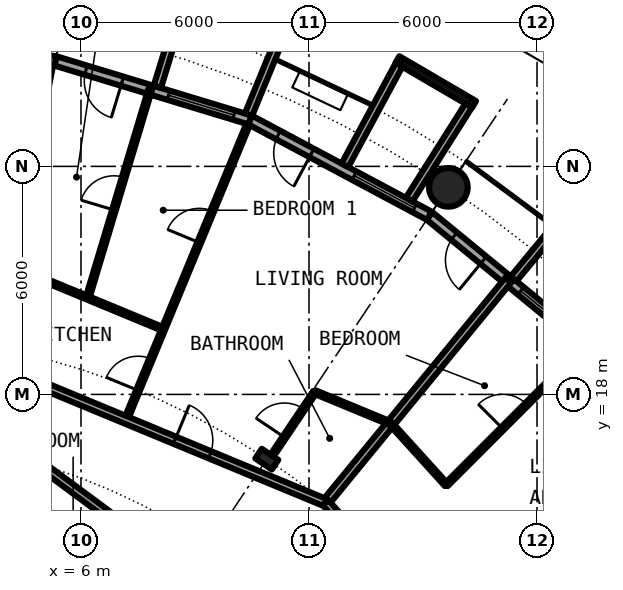
"""IFC4 building model, lengths in metres.
Left out: names, types, materials, properties, quantities, classifications, styles, units other than length and angle.
Written with IfcOpenShell. Run it as: python <this file> out.ifc"""

import sys

from ifc_helpers import new_model, si_unit, direction, frame, frame_2d, origin, origin_2d, place, context, subcontext, project, spatial, rectangle, circle, hollow_circle, i_section, extrude, element, fill, save


model = new_model("IFC4")
c1 = context("Model", 3, precision=1e-05, world=origin(), true_north=direction((0.0, 1.0)))
c2 = subcontext(c1, "Body", "Model", "MODEL_VIEW")
j1 = project(units=[si_unit("LENGTHUNIT", "METRE"), si_unit("PLANEANGLEUNIT", "RADIAN")], contexts=[c1])
p1 = place(None, origin())
s1 = spatial("IfcSite", under=j1, at=p1, CompositionType="ELEMENT")
p2 = place(p1, origin())
s2 = spatial("IfcBuilding", under=s1, at=p2, CompositionType="ELEMENT")
p3 = place(p2, frame((0.0, 0.0, 72.75)))
s3 = spatial("IfcBuildingStorey", under=s2, at=p3, CompositionType="ELEMENT", Elevation=72.75)
p4 = place(p3, frame((15.667, 23.448, 0.0), z_axis=(0.0, 0.0, 1.0), x_axis=(1.0, 0.0, 0.0)))
e1 = element("IfcColumn", 1, at=p4, inside=s3, PredefinedType="COLUMN", context=c2, shape_type="SweptSolid", body=[
    extrude(hollow_circle(Radius=0.508, WallThickness=0.04, at=origin_2d()), origin(), (0.0, 0.0, 1.0), 3.05),
])
p5 = place(p3, frame((10.889, 16.297, 0.0), z_axis=(0.0, 0.0, 1.0), x_axis=(0.55557023302, 0.831469612303, 0.0)))
e2 = element("IfcColumn", 2, at=p5, inside=s3, PredefinedType="COLUMN", context=c2, shape_type="SweptSolid", body=[
    extrude(i_section(OverallWidth=0.306, OverallDepth=0.524, WebThickness=0.021, FlangeThickness=0.04, FilletRadius=0.027, at=origin_2d()), origin(), (0.0, 0.0, 1.0), 3.05),
])
p6 = place(p3, frame((19.304, 19.304, 0.0), z_axis=(0.0, 0.0, 1.0), x_axis=(-0.773019449054, 0.634382322723, 0.0)))
e3 = element("IfcWall", 3, at=p6, inside=s3, PredefinedType="SOLIDWALL", context=c2, shape_type="SweptSolid", body=[
    extrude(rectangle(XDim=5.352, YDim=0.25, at=frame_2d((2.676, 0.0))), origin(), (0.0, 0.0, 1.0), 2.7),
])
p7 = place(p6, frame((0.441, 0.0, 0.3)))
e4 = element("IfcOpeningElement", 4, at=p7, cuts=e3, PredefinedType="OPENING", context=c2, shape_type="SweptSolid", body=[
    extrude(rectangle(XDim=1.8, YDim=2.1, at=frame_2d((0.9, 1.05))), frame((0.0, 0.135, 0.0), z_axis=(0.0, -1.0, 0.0), x_axis=(1.0, 0.0, 0.0)), (0.0, 0.0, 1.0), 0.27),
])
p8 = place(p6, frame((3.51, 0.0, 0.0)))
e5 = element("IfcOpeningElement", 5, at=p8, cuts=e3, PredefinedType="OPENING", context=c2, shape_type="SweptSolid", body=[
    extrude(rectangle(XDim=1.0, YDim=2.2, at=frame_2d((0.5, 1.1))), frame((0.0, 0.135, 0.0), z_axis=(0.0, -1.0, 0.0), x_axis=(1.0, 0.0, 0.0)), (0.0, 0.0, 1.0), 0.27),
])
p9 = place(p3, frame((17.384, 21.041, -0.03), z_axis=(0.0, 0.0, 1.0), x_axis=(0.63709551667, 0.770784861449, 0.0)))
e6 = element("IfcWall", 6, at=p9, inside=s3, PredefinedType="SOLIDWALL", context=c2, shape_type="SweptSolid", body=[
    extrude(rectangle(XDim=3.006, YDim=0.2, at=frame_2d((1.503, 0.0))), origin(), (0.0, 0.0, 1.0), 2.73),
])
p10 = place(p3, frame((15.167, 22.699, 0.0), z_axis=(0.0, 0.0, 1.0), x_axis=(-0.881915646801, 0.471407246368, 0.0)))
e7 = element("IfcWall", 7, at=p10, inside=s3, PredefinedType="SOLIDWALL", context=c2, shape_type="SweptSolid", body=[
    extrude(rectangle(XDim=5.352, YDim=0.25, at=frame_2d((2.676, 0.0))), origin(), (0.0, 0.0, 1.0), 2.7),
])
p11 = place(p10, frame((0.441, 0.0, 0.3)))
e8 = element("IfcOpeningElement", 8, at=p11, cuts=e7, PredefinedType="OPENING", context=c2, shape_type="SweptSolid", body=[
    extrude(rectangle(XDim=1.8, YDim=2.1, at=frame_2d((0.9, 1.05))), frame((0.0, 0.135, 0.0), z_axis=(0.0, -1.0, 0.0), x_axis=(1.0, 0.0, 0.0)), (0.0, 0.0, 1.0), 0.27),
])
p12 = place(p10, frame((3.51, 0.0, 0.0)))
e9 = element("IfcOpeningElement", 9, at=p12, cuts=e7, PredefinedType="OPENING", context=c2, shape_type="SweptSolid", body=[
    extrude(rectangle(XDim=1.0, YDim=2.2, at=frame_2d((0.5, 1.1))), frame((0.0, 0.135, 0.0), z_axis=(0.0, -1.0, 0.0), x_axis=(1.0, 0.0, 0.0)), (0.0, 0.0, 1.0), 0.27),
])
p13 = place(p3, frame((16.344, 25.633, -0.03), z_axis=(0.0, 0.0, 1.0), x_axis=(-0.863346521872, 0.504611517081, 0.0)))
e10 = element("IfcWall", 10, at=p13, inside=s3, PredefinedType="SOLIDWALL", context=c2, shape_type="SweptSolid", body=[
    extrude(rectangle(XDim=2.336, YDim=0.2, at=frame_2d((1.168, 0.0))), origin(), (0.0, 0.0, 1.0), 2.73),
])
p14 = place(p13, frame((0.128, 0.0, 0.33)))
e11 = element("IfcOpeningElement", 11, at=p14, cuts=e10, PredefinedType="OPENING", context=c2, shape_type="SweptSolid", body=[
    extrude(circle(Radius=1.04, at=frame_2d((1.04, 1.04))), frame((0.0, 0.11, 0.0), z_axis=(0.0, -1.0, 0.0), x_axis=(1.0, 0.0, 0.0)), (0.0, 0.0, 1.0), 0.22),
])
p15 = place(p3, frame((14.635, 23.126, -0.03), z_axis=(0.0, 0.0, 1.0), x_axis=(0.534437802731, 0.845207805816, 0.0)))
e12 = element("IfcWall", 12, at=p15, inside=s3, PredefinedType="SOLIDWALL", context=c2, shape_type="SweptSolid", body=[
    extrude(rectangle(XDim=2.932, YDim=0.2, at=frame_2d((1.466, 0.0))), origin(), (0.0, 0.0, 1.0), 2.73),
])
p16 = place(p3, frame((12.945, 24.029, -0.03), z_axis=(0.0, 0.0, 1.0), x_axis=(0.474424310775, 0.88029629861, 0.0)))
e13 = element("IfcWall", 13, at=p16, inside=s3, PredefinedType="SOLIDWALL", context=c2, shape_type="SweptSolid", body=[
    extrude(rectangle(XDim=3.006, YDim=0.2, at=frame_2d((1.503, 0.0))), origin(), (0.0, 0.0, 1.0), 2.73),
])
p17 = place(p3, frame((10.447, 25.222, 0.0), z_axis=(0.0, 0.0, 1.0), x_axis=(-0.956965678721, 0.290201119486, 0.0)))
e14 = element("IfcWall", 14, at=p17, inside=s3, PredefinedType="SOLIDWALL", context=c2, shape_type="SweptSolid", body=[
    extrude(rectangle(XDim=5.351, YDim=0.25, at=frame_2d((2.676, 0.0))), origin(), (0.0, 0.0, 1.0), 2.7),
])
p18 = place(p17, frame((0.441, 0.0, 0.3)))
e15 = element("IfcOpeningElement", 15, at=p18, cuts=e14, PredefinedType="OPENING", context=c2, shape_type="SweptSolid", body=[
    extrude(rectangle(XDim=1.8, YDim=2.1, at=frame_2d((0.9, 1.05))), frame((0.0, 0.135, 0.0), z_axis=(0.0, -1.0, 0.0), x_axis=(1.0, 0.0, 0.0)), (0.0, 0.0, 1.0), 0.27),
])
p19 = place(p17, frame((3.51, 0.0, 0.0)))
e16 = element("IfcOpeningElement", 16, at=p19, cuts=e14, PredefinedType="OPENING", context=c2, shape_type="SweptSolid", body=[
    extrude(rectangle(XDim=1.0, YDim=2.2, at=frame_2d((0.5, 1.1))), frame((0.0, 0.135, 0.0), z_axis=(0.0, -1.0, 0.0), x_axis=(1.0, 0.0, 0.0)), (0.0, 0.0, 1.0), 0.27),
])
p20 = place(p3, frame((10.409, 25.364, -0.03), z_axis=(0.0, 0.0, 1.0), x_axis=(0.379509886562, 0.925187681501, 0.0)))
e17 = element("IfcWall", 17, at=p20, inside=s3, PredefinedType="SOLIDWALL", context=c2, shape_type="SweptSolid", body=[
    extrude(rectangle(XDim=2.883, YDim=0.2, at=frame_2d((1.441, 0.0))), origin(), (0.0, 0.0, 1.0), 2.73),
])
p21 = place(p3, frame((8.009, 26.092, -0.03), z_axis=(0.0, 0.0, 1.0), x_axis=(0.293406695073, 0.955987715029, 0.0)))
e18 = element("IfcWall", 18, at=p21, inside=s3, PredefinedType="SOLIDWALL", context=c2, shape_type="SweptSolid", body=[
    extrude(rectangle(XDim=3.006, YDim=0.2, at=frame_2d((1.503, 0.0))), origin(), (0.0, 0.0, 1.0), 2.73),
])
p22 = place(p3, frame((5.326, 26.775, 0.0), z_axis=(0.0, 0.0, 1.0), x_axis=(-0.995173996315, 0.098126026407, 0.0)))
e19 = element("IfcWall", 19, at=p22, inside=s3, PredefinedType="SOLIDWALL", context=c2, shape_type="SweptSolid", body=[
    extrude(rectangle(XDim=5.352, YDim=0.25, at=frame_2d((2.676, 0.0))), origin(), (0.0, 0.0, 1.0), 2.7),
])
p23 = place(p22, frame((0.441, 0.0, 0.3)))
e20 = element("IfcOpeningElement", 20, at=p23, cuts=e19, PredefinedType="OPENING", context=c2, shape_type="SweptSolid", body=[
    extrude(rectangle(XDim=1.8, YDim=2.1, at=frame_2d((0.9, 1.05))), frame((0.0, 0.135, 0.0), z_axis=(0.0, -1.0, 0.0), x_axis=(1.0, 0.0, 0.0)), (0.0, 0.0, 1.0), 0.27),
])
p24 = place(p22, frame((3.51, 0.0, 0.0)))
e21 = element("IfcOpeningElement", 21, at=p24, cuts=e19, PredefinedType="OPENING", context=c2, shape_type="SweptSolid", body=[
    extrude(rectangle(XDim=1.0, YDim=2.2, at=frame_2d((0.5, 1.1))), frame((0.0, 0.135, 0.0), z_axis=(0.0, -1.0, 0.0), x_axis=(1.0, 0.0, 0.0)), (0.0, 0.0, 1.0), 0.27),
])
p25 = place(p3, frame((4.671, 26.966, -0.03), z_axis=(0.0, 0.0, 1.0), x_axis=(0.170539878907, 0.985350774954, 0.0)))
e22 = element("IfcWall", 22, at=p25, inside=s3, PredefinedType="SOLIDWALL", context=c2, shape_type="SweptSolid", body=[
    extrude(rectangle(XDim=2.932, YDim=0.2, at=frame_2d((1.466, 0.0))), origin(), (0.0, 0.0, 1.0), 2.73),
])
p26 = place(p3, frame((7.178, 17.328, 0.0), z_axis=(0.0, 0.0, 1.0), x_axis=(0.382458509789, 0.923972666419, 0.0)))
e23 = element("IfcWall", 23, at=p26, inside=s3, PredefinedType="PARTITIONING", context=c2, shape_type="SweptSolid", body=[
    extrude(rectangle(XDim=8.419, YDim=0.1, at=frame_2d((4.209, 0.0))), origin(), (0.0, 0.0, 1.0), 2.7),
])
p27 = place(p26, frame((0.841, 0.0, 0.0)))
e24 = element("IfcOpeningElement", 24, at=p27, cuts=e23, PredefinedType="OPENING", context=c2, shape_type="SweptSolid", body=[
    extrude(rectangle(XDim=0.9, YDim=2.3, at=frame_2d((0.45, 1.15))), frame((0.0, 0.06, 0.0), z_axis=(0.0, -1.0, 0.0), x_axis=(1.0, 0.0, 0.0)), (0.0, 0.0, 1.0), 0.12),
])
p28 = place(p26, frame((5.051, 0.0, 0.0)))
e25 = element("IfcOpeningElement", 25, at=p28, cuts=e23, PredefinedType="OPENING", context=c2, shape_type="SweptSolid", body=[
    extrude(rectangle(XDim=0.9, YDim=2.3, at=frame_2d((0.45, 1.15))), frame((0.0, 0.06, 0.0), z_axis=(0.0, -1.0, 0.0), x_axis=(1.0, 0.0, 0.0)), (0.0, 0.0, 1.0), 0.12),
])
p29 = place(p3, frame((16.515, 11.034, 0.0), z_axis=(0.0, 0.0, 1.0), x_axis=(0.831382022135, 0.555701298605, 0.0)))
e26 = element("IfcWall", 26, at=p29, inside=s3, PredefinedType="PARTITIONING", context=c2, shape_type="SweptSolid", body=[
    extrude(rectangle(XDim=7.313, YDim=0.2, at=frame_2d((3.657, 0.0))), origin(), (0.0, 0.0, 1.0), 2.7),
])
p30 = place(p3, frame((4.179, 21.367, 0.0), z_axis=(0.0, 0.0, 1.0), x_axis=(0.192109041462, 0.981373586453, 0.0)))
e27 = element("IfcWall", 27, at=p30, inside=s3, PredefinedType="PARTITIONING", context=c2, shape_type="SweptSolid", body=[
    extrude(rectangle(XDim=5.404, YDim=0.1, at=frame_2d((2.702, 0.0))), origin(), (0.0, 0.0, 1.0), 2.7),
])
p31 = place(p30, frame((2.252, 0.0, 0.0)))
e28 = element("IfcOpeningElement", 28, at=p31, cuts=e27, PredefinedType="OPENING", context=c2, shape_type="SweptSolid", body=[
    extrude(rectangle(XDim=0.9, YDim=2.3, at=frame_2d((0.45, 1.15))), frame((0.0, 0.06, 0.0), z_axis=(0.0, -1.0, 0.0), x_axis=(1.0, 0.0, 0.0)), (0.0, 0.0, 1.0), 0.12),
])
p32 = place(p3, frame((6.173, 20.541, 0.0), z_axis=(0.0, 0.0, 1.0), x_axis=(0.287793773423, 0.957692405723, 0.0)))
e29 = element("IfcWall", 29, at=p32, inside=s3, PredefinedType="PARTITIONING", context=c2, shape_type="SweptSolid", body=[
    extrude(rectangle(XDim=5.726, YDim=0.1, at=frame_2d((2.863, 0.0))), origin(), (0.0, 0.0, 1.0), 2.7),
])
p33 = place(p32, frame((2.413, 0.0, 0.0)))
e30 = element("IfcOpeningElement", 30, at=p33, cuts=e29, PredefinedType="OPENING", context=c2, shape_type="SweptSolid", body=[
    extrude(rectangle(XDim=0.9, YDim=2.3, at=frame_2d((0.45, 1.15))), frame((0.0, 0.06, 0.0), z_axis=(0.0, -1.0, 0.0), x_axis=(1.0, 0.0, 0.0)), (0.0, 0.0, 1.0), 0.12),
])
p34 = place(p3, frame((11.087, 16.48, 0.0), z_axis=(0.0, 0.0, 1.0), x_axis=(0.558383137663, 0.829583191472, 0.0)))
e31 = element("IfcWall", 31, at=p34, inside=s3, PredefinedType="PARTITIONING", context=c2, shape_type="SweptSolid", body=[
    extrude(rectangle(XDim=1.909, YDim=0.1, at=frame_2d((0.955, 0.0))), origin(), (0.0, 0.0, 1.0), 2.7),
])
p35 = place(p34, frame((0.474, 0.0, 0.0)))
e32 = element("IfcOpeningElement", 32, at=p35, cuts=e31, PredefinedType="OPENING", context=c2, shape_type="SweptSolid", body=[
    extrude(rectangle(XDim=0.9, YDim=2.3, at=frame_2d((0.45, 1.15))), frame((0.0, 0.06, 0.0), z_axis=(0.0, -1.0, 0.0), x_axis=(1.0, 0.0, 0.0)), (0.0, 0.0, 1.0), 0.12),
])
p36 = place(p3, frame((12.435, 15.15, 0.0), z_axis=(0.0, 0.0, 1.0), x_axis=(0.634458323308, 0.772957072537, 0.0)))
e33 = element("IfcWall", 33, at=p36, inside=s3, PredefinedType="PARTITIONING", context=c2, shape_type="SweptSolid", body=[
    extrude(rectangle(XDim=7.576, YDim=0.2, at=frame_2d((3.788, 0.0))), origin(), (0.0, 0.0, 1.0), 2.7),
])
p37 = place(p3, frame((15.612, 15.622, 0.0), z_axis=(0.0, 0.0, 1.0), x_axis=(0.706914880313, 0.707298629994, 0.0)))
e34 = element("IfcWall", 34, at=p37, inside=s3, PredefinedType="PARTITIONING", context=c2, shape_type="SweptSolid", body=[
    extrude(rectangle(XDim=5.09, YDim=0.1, at=frame_2d((2.545, 0.0))), origin(), (0.0, 0.0, 1.0), 2.7),
])
p38 = place(p37, frame((2.095, 0.0, 0.0)))
e35 = element("IfcOpeningElement", 35, at=p38, cuts=e34, PredefinedType="OPENING", context=c2, shape_type="SweptSolid", body=[
    extrude(rectangle(XDim=0.9, YDim=2.3, at=frame_2d((0.45, 1.15))), frame((0.0, 0.06, 0.0), z_axis=(0.0, -1.0, 0.0), x_axis=(1.0, 0.0, 0.0)), (0.0, 0.0, 1.0), 0.12),
])
p39 = place(p3, frame((4.906, 16.172, 0.0), z_axis=(0.0, 0.0, 1.0), x_axis=(0.803204584823, -0.59570327758, 0.0)))
e36 = element("IfcWall", 36, at=p39, inside=s3, PredefinedType="PARTITIONING", context=c2, shape_type="SweptSolid", body=[
    extrude(rectangle(XDim=11.387, YDim=0.2, at=frame_2d((5.693, 0.0))), origin(), (0.0, 0.0, 1.0), 2.7),
])
p40 = place(p39, frame((4.38, 0.0, 0.0)))
e37 = element("IfcOpeningElement", 37, at=p40, cuts=e36, PredefinedType="OPENING", context=c2, shape_type="SweptSolid", body=[
    extrude(rectangle(XDim=1.0, YDim=2.3, at=frame_2d((0.5, 1.15))), frame((0.0, 0.11, 0.0), z_axis=(0.0, -1.0, 0.0), x_axis=(1.0, 0.0, 0.0)), (0.0, 0.0, 1.0), 0.22),
])
p41 = place(p3, frame((1.921, 19.506, 0.0), z_axis=(0.0, 0.0, 1.0), x_axis=(0.923845560554, -0.38276543763, 0.0)))
e38 = element("IfcWall", 38, at=p41, inside=s3, PredefinedType="PARTITIONING", context=c2, shape_type="SweptSolid", body=[
    extrude(rectangle(XDim=11.381, YDim=0.2, at=frame_2d((5.69, 0.0))), origin(), (0.0, 0.0, 1.0), 2.7),
])
p42 = place(p41, frame((7.087, 0.0, 0.0)))
e39 = element("IfcOpeningElement", 39, at=p42, cuts=e38, PredefinedType="OPENING", context=c2, shape_type="SweptSolid", body=[
    extrude(rectangle(XDim=1.0, YDim=2.3, at=frame_2d((0.5, 1.15))), frame((0.0, 0.11, 0.0), z_axis=(0.0, -1.0, 0.0), x_axis=(1.0, 0.0, 0.0)), (0.0, 0.0, 1.0), 0.22),
])
p43 = place(p3, frame((12.434, 15.151, 0.0), z_axis=(0.0, 0.0, 1.0), x_axis=(0.671601747072, -0.740912338492, 0.0)))
e40 = element("IfcWall", 40, at=p43, inside=s3, PredefinedType="PARTITIONING", context=c2, shape_type="SweptSolid", body=[
    extrude(rectangle(XDim=5.597, YDim=0.2, at=frame_2d((2.799, 0.0))), origin(), (0.0, 0.0, 1.0), 2.38),
])
p44 = place(p43, frame((1.417, 0.0, 0.0)))
e41 = element("IfcOpeningElement", 41, at=p44, cuts=e40, PredefinedType="OPENING", context=c2, shape_type="SweptSolid", body=[
    extrude(rectangle(XDim=1.0, YDim=2.3, at=frame_2d((0.5, 1.15))), frame((0.0, 0.11, 0.0), z_axis=(0.0, -1.0, 0.0), x_axis=(1.0, 0.0, 0.0)), (0.0, 0.0, 1.0), 0.22),
])
p45 = place(p3, frame((2.185, 22.193, 0.0), z_axis=(0.0, 0.0, 1.0), x_axis=(0.923844914631, -0.382766996632, 0.0)))
e42 = element("IfcWall", 42, at=p45, inside=s3, PredefinedType="PARTITIONING", context=c2, shape_type="SweptSolid", body=[
    extrude(rectangle(XDim=6.474, YDim=0.1, at=frame_2d((3.237, 0.0))), origin(), (0.0, 0.0, 1.0), 2.7),
])
p46 = place(p3, frame((12.155, 18.062, 0.0), z_axis=(0.0, 0.0, 1.0), x_axis=(0.923874819588, -0.382694810171, 0.0)))
e43 = element("IfcWall", 43, at=p46, inside=s3, PredefinedType="PARTITIONING", context=c2, shape_type="SweptSolid", body=[
    extrude(rectangle(XDim=2.158, YDim=0.1, at=frame_2d((1.079, 0.0))), origin(), (0.0, 0.0, 1.0), 2.7),
])
p47 = place(p3, frame((14.147, 17.238, 0.0), z_axis=(0.0, 0.0, 1.0), x_axis=(0.671674967707, -0.740845960882, 0.0)))
e44 = element("IfcWall", 44, at=p47, inside=s3, PredefinedType="PARTITIONING", context=c2, shape_type="SweptSolid", body=[
    extrude(rectangle(XDim=2.181, YDim=0.1, at=frame_2d((1.091, 0.0))), origin(), (0.0, 0.0, 1.0), 2.7),
])
p48 = place(p7, origin())
e45 = element("IfcWindow", 45, at=p48, inside=s3, PartitioningType="SINGLE_PANEL", PredefinedType="WINDOW", context=c2, shape_type="SweptSolid", body=[
    extrude(rectangle(XDim=1.8, YDim=2.1, at=frame_2d((0.9, 1.05))), frame((0.0, 0.03, 0.0), z_axis=(0.0, -1.0, 0.0), x_axis=(1.0, 0.0, 0.0)), (0.0, 0.0, 1.0), 0.06),
])
fill(e4, e45)
p49 = place(p8, origin())
e46 = element("IfcDoor", 46, at=p49, inside=s3, OperationType="SINGLE_SWING_LEFT", PredefinedType="DOOR", context=c2, shape_type="SweptSolid", body=[
    extrude(rectangle(XDim=1.0, YDim=2.2, at=frame_2d((0.5, 1.1))), frame((0.0, 0.025, 0.0), z_axis=(0.0, -1.0, 0.0), x_axis=(1.0, 0.0, 0.0)), (0.0, 0.0, 1.0), 0.05),
])
fill(e5, e46)
p50 = place(p11, origin())
e47 = element("IfcWindow", 47, at=p50, inside=s3, PartitioningType="SINGLE_PANEL", PredefinedType="WINDOW", context=c2, shape_type="SweptSolid", body=[
    extrude(rectangle(XDim=1.8, YDim=2.1, at=frame_2d((0.9, 1.05))), frame((0.0, 0.03, 0.0), z_axis=(0.0, -1.0, 0.0), x_axis=(1.0, 0.0, 0.0)), (0.0, 0.0, 1.0), 0.06),
])
fill(e8, e47)
p51 = place(p14, origin())
e48 = element("IfcWindow", 48, at=p51, inside=s3, PartitioningType="SINGLE_PANEL", PredefinedType="WINDOW", context=c2, shape_type="SweptSolid", body=[
    extrude(circle(Radius=1.04, at=frame_2d((1.04, 1.04))), frame((0.0, 0.03, 0.0), z_axis=(0.0, -1.0, 0.0), x_axis=(1.0, 0.0, 0.0)), (0.0, 0.0, 1.0), 0.06),
])
fill(e11, e48)
p52 = place(p12, origin())
e49 = element("IfcDoor", 49, at=p52, inside=s3, OperationType="SINGLE_SWING_LEFT", PredefinedType="DOOR", context=c2, shape_type="SweptSolid", body=[
    extrude(rectangle(XDim=1.0, YDim=2.2, at=frame_2d((0.5, 1.1))), frame((0.0, 0.025, 0.0), z_axis=(0.0, -1.0, 0.0), x_axis=(1.0, 0.0, 0.0)), (0.0, 0.0, 1.0), 0.05),
])
fill(e9, e49)
p53 = place(p18, origin())
e50 = element("IfcWindow", 50, at=p53, inside=s3, PartitioningType="SINGLE_PANEL", PredefinedType="WINDOW", context=c2, shape_type="SweptSolid", body=[
    extrude(rectangle(XDim=1.8, YDim=2.1, at=frame_2d((0.9, 1.05))), frame((0.0, 0.03, 0.0), z_axis=(0.0, -1.0, 0.0), x_axis=(1.0, 0.0, 0.0)), (0.0, 0.0, 1.0), 0.06),
])
fill(e15, e50)
p54 = place(p19, origin())
e51 = element("IfcDoor", 51, at=p54, inside=s3, OperationType="SINGLE_SWING_LEFT", PredefinedType="DOOR", context=c2, shape_type="SweptSolid", body=[
    extrude(rectangle(XDim=1.0, YDim=2.2, at=frame_2d((0.5, 1.1))), frame((0.0, 0.025, 0.0), z_axis=(0.0, -1.0, 0.0), x_axis=(1.0, 0.0, 0.0)), (0.0, 0.0, 1.0), 0.05),
])
fill(e16, e51)
p55 = place(p38, origin())
e52 = element("IfcDoor", 52, at=p55, inside=s3, OperationType="SINGLE_SWING_LEFT", PredefinedType="DOOR", context=c2, shape_type="SweptSolid", body=[
    extrude(rectangle(XDim=0.9, YDim=2.3, at=frame_2d((0.45, 1.15))), frame((0.0, 0.025, 0.0), z_axis=(0.0, -1.0, 0.0), x_axis=(1.0, 0.0, 0.0)), (0.0, 0.0, 1.0), 0.05),
])
fill(e35, e52)
p56 = place(p42, origin())
e53 = element("IfcDoor", 53, at=p56, inside=s3, OperationType="SINGLE_SWING_RIGHT", PredefinedType="DOOR", context=c2, shape_type="SweptSolid", body=[
    extrude(rectangle(XDim=1.0, YDim=2.3, at=frame_2d((0.5, 1.15))), frame((0.0, 0.025, 0.0), z_axis=(0.0, -1.0, 0.0), x_axis=(1.0, 0.0, 0.0)), (0.0, 0.0, 1.0), 0.05),
])
fill(e39, e53)
p57 = place(p35, origin())
e54 = element("IfcDoor", 54, at=p57, inside=s3, OperationType="SINGLE_SWING_LEFT", PredefinedType="DOOR", context=c2, shape_type="SweptSolid", body=[
    extrude(rectangle(XDim=0.9, YDim=2.3, at=frame_2d((0.45, 1.15))), frame((0.0, 0.025, 0.0), z_axis=(0.0, -1.0, 0.0), x_axis=(1.0, 0.0, 0.0)), (0.0, 0.0, 1.0), 0.05),
])
fill(e32, e54)
p58 = place(p27, origin())
e55 = element("IfcDoor", 55, at=p58, inside=s3, OperationType="SINGLE_SWING_LEFT", PredefinedType="DOOR", context=c2, shape_type="SweptSolid", body=[
    extrude(rectangle(XDim=0.9, YDim=2.3, at=frame_2d((0.45, 1.15))), frame((0.0, 0.025, 0.0), z_axis=(0.0, -1.0, 0.0), x_axis=(1.0, 0.0, 0.0)), (0.0, 0.0, 1.0), 0.05),
])
fill(e24, e55)
p59 = place(p28, origin())
e56 = element("IfcDoor", 56, at=p59, inside=s3, OperationType="SINGLE_SWING_RIGHT", PredefinedType="DOOR", context=c2, shape_type="SweptSolid", body=[
    extrude(rectangle(XDim=0.9, YDim=2.3, at=frame_2d((0.45, 1.15))), frame((0.0, 0.025, 0.0), z_axis=(0.0, -1.0, 0.0), x_axis=(1.0, 0.0, 0.0)), (0.0, 0.0, 1.0), 0.05),
])
fill(e25, e56)
p60 = place(p33, origin())
e57 = element("IfcDoor", 57, at=p60, inside=s3, OperationType="SINGLE_SWING_RIGHT", PredefinedType="DOOR", context=c2, shape_type="SweptSolid", body=[
    extrude(rectangle(XDim=0.9, YDim=2.3, at=frame_2d((0.45, 1.15))), frame((0.0, 0.025, 0.0), z_axis=(0.0, -1.0, 0.0), x_axis=(1.0, 0.0, 0.0)), (0.0, 0.0, 1.0), 0.05),
])
fill(e30, e57)
save(model, sys.argv[1])
